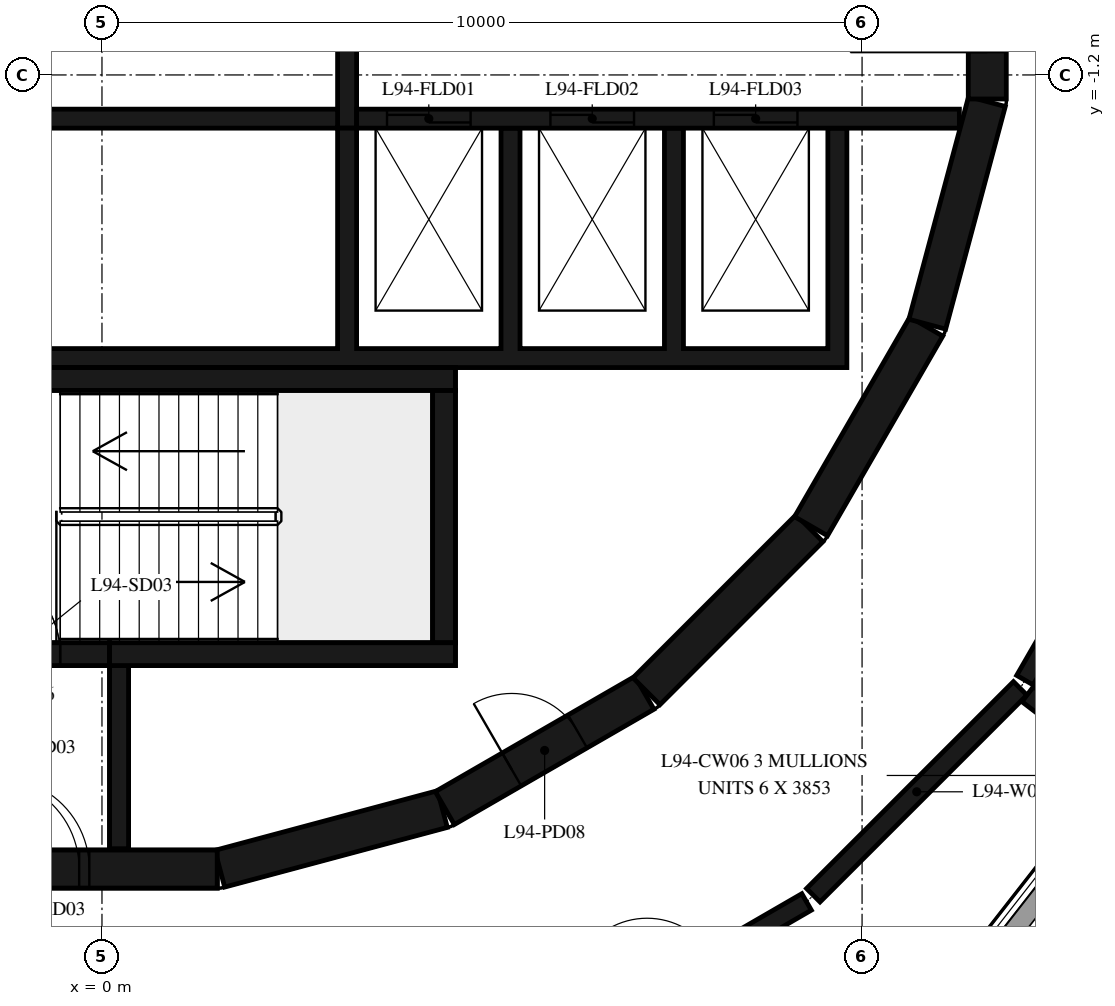
"""IFC4 building model, lengths in metres.
Left out: names, types, materials, properties, quantities, classifications, styles, units other than length and angle.
Written with IfcOpenShell. Run it as: python <this file> out.ifc"""

import sys

from ifc_helpers import new_model, si_unit, direction, frame, frame_2d, origin, place, context, subcontext, project, spatial, polyline, rectangle, outline, extrude, element, fill, save


model = new_model("IFC4")
c1 = context("Model", 3, precision=1e-05, world=origin(), true_north=direction((0.0, 1.0)))
c2 = subcontext(c1, "Body", "Model", "MODEL_VIEW")
j1 = project(units=[si_unit("LENGTHUNIT", "METRE"), si_unit("PLANEANGLEUNIT", "RADIAN")], contexts=[c1])
p1 = place(None, origin())
s1 = spatial("IfcSite", under=j1, at=p1, CompositionType="ELEMENT")
p2 = place(p1, origin())
s2 = spatial("IfcBuilding", under=s1, at=p2, CompositionType="ELEMENT")
p3 = place(p2, frame((0.0, 0.0, 366.2)))
s3 = spatial("IfcBuildingStorey", under=s2, at=p3, CompositionType="ELEMENT", Elevation=366.2)
p4 = place(p3, frame((1.55, -11.643, 0.0), z_axis=(0.0, 0.0, 1.0), x_axis=(0.965948410781, 0.258734743916, 0.0)))
e1 = element("IfcWall", 1, at=p4, inside=s3, PredefinedType="SHEAR", context=c2, shape_type="SweptSolid", body=[
    extrude(rectangle(XDim=3.033, YDim=0.5, at=frame_2d((1.516, 0.0))), origin(), (0.0, 0.0, 1.0), 4.8),
])
p5 = place(p3, frame((4.51, -10.845, 0.0), z_axis=(0.0, 0.0, 1.0), x_axis=(0.865975092491, 0.500087131594, 0.0)))
e2 = element("IfcWall", 2, at=p5, inside=s3, PredefinedType="SHEAR", context=c2, shape_type="SweptSolid", body=[
    extrude(rectangle(XDim=3.033, YDim=0.5, at=frame_2d((1.516, 0.0))), origin(), (0.0, 0.0, 1.0), 4.8),
])
p6 = place(p5, frame((1.016, 0.0, 0.0)))
e3 = element("IfcOpeningElement", 3, at=p6, cuts=e2, PredefinedType="OPENING", context=c2, shape_type="SweptSolid", body=[
    extrude(rectangle(XDim=1.0, YDim=2.4, at=frame_2d((0.5, 1.2))), frame((0.0, 0.26, 0.0), z_axis=(0.0, -1.0, 0.0), x_axis=(1.0, 0.0, 0.0)), (0.0, 0.0, 1.0), 0.52),
])
p7 = place(p3, frame((7.164, -9.308, 0.0), z_axis=(0.0, 0.0, 1.0), x_axis=(0.707106781187, 0.707106781187, 0.0)))
e4 = element("IfcWall", 4, at=p7, inside=s3, PredefinedType="SHEAR", context=c2, shape_type="SweptSolid", body=[
    extrude(rectangle(XDim=3.032, YDim=0.5, at=frame_2d((1.516, 0.0))), origin(), (0.0, 0.0, 1.0), 4.8),
])
for number, where, z_axis, x_axis in (
    (5, (9.329, -7.137, 0.0), (0.0, 0.0, 1.0), (0.5, 0.866, 0.0)),
    (6, (10.858, -4.479, 0.0), (0.0, 0.0, 1.0), (0.259, 0.966, 0.0)),
):
    element("IfcWall", number, at=place(p3, frame(where, z_axis=z_axis, x_axis=x_axis)), inside=s3, PredefinedType="SHEAR", context=c2, shape_type="SweptSolid", body=[
        extrude(rectangle(XDim=3.033, YDim=0.5, at=frame_2d((1.516, 0.0))), origin(), (0.0, 0.0, 1.0), 4.8),
    ])
p8 = place(p3, frame((11.647, -1.516, 0.0), z_axis=(0.0, 0.0, 1.0), x_axis=(0.0, 1.0, 0.0)))
e7 = element("IfcWall", 7, at=p8, inside=s3, PredefinedType="SHEAR", context=c2, shape_type="SweptSolid", body=[
    extrude(rectangle(XDim=3.033, YDim=0.5, at=frame_2d((1.516, 0.0))), origin(), (0.0, 0.0, 1.0), 4.8),
])
p9 = place(p8, frame((0.616, 0.0, 0.0)))
e8 = element("IfcOpeningElement", 8, at=p9, cuts=e7, PredefinedType="OPENING", context=c2, shape_type="SweptSolid", body=[
    extrude(rectangle(XDim=1.8, YDim=2.1, at=frame_2d((0.9, 1.05))), frame((0.0, 0.26, 0.0), z_axis=(0.0, -1.0, 0.0), x_axis=(1.0, 0.0, 0.0)), (0.0, 0.0, 1.0), 0.52),
])
p10 = place(p3, frame((-1.516, -11.647, 0.0), z_axis=(0.0, 0.0, 1.0), x_axis=(1.0, 0.0, 0.0)))
e9 = element("IfcWall", 9, at=p10, inside=s3, PredefinedType="SHEAR", context=c2, shape_type="SweptSolid", body=[
    extrude(rectangle(XDim=3.033, YDim=0.5, at=frame_2d((1.516, 0.0))), origin(), (0.0, 0.0, 1.0), 4.8),
])
p11 = place(p10, frame((0.016, 0.0, 0.0)))
e10 = element("IfcOpeningElement", 10, at=p11, cuts=e9, PredefinedType="OPENING", context=c2, shape_type="SweptSolid", body=[
    extrude(rectangle(XDim=1.2, YDim=2.1, at=frame_2d((0.6, 1.05))), frame((0.0, 0.26, 0.0), z_axis=(0.0, -1.0, 0.0), x_axis=(1.0, 0.0, 0.0)), (0.0, 0.0, 1.0), 0.52),
])
p12 = place(p3, frame((-2.4, -5.2, 0.0), z_axis=(0.0, 0.0, 1.0), x_axis=(1.0, 0.0, 0.0)))
e11 = element("IfcWall", 11, at=p12, inside=s3, PredefinedType="SHEAR", context=c2, shape_type="SweptSolid", body=[
    extrude(rectangle(XDim=7.05, YDim=0.3, at=frame_2d((3.525, 0.0))), origin(), (0.0, 0.0, 1.0), 4.8),
])
p13 = place(p3, frame((4.5, -8.67, 0.0), z_axis=(0.0, 0.0, 1.0), x_axis=(0.0, 1.0, 0.0)))
e12 = element("IfcWall", 12, at=p13, inside=s3, PredefinedType="SHEAR", context=c2, shape_type="SweptSolid", body=[
    extrude(rectangle(XDim=3.32, YDim=0.3, at=frame_2d((1.66, 0.0))), origin(), (0.0, 0.0, 1.0), 4.8),
])
p14 = place(p3, frame((0.1, -8.82, 0.0), z_axis=(0.0, 0.0, 1.0), x_axis=(1.0, 0.0, 0.0)))
e13 = element("IfcWall", 13, at=p14, inside=s3, PredefinedType="SHEAR", context=c2, shape_type="SweptSolid", body=[
    extrude(rectangle(XDim=4.55, YDim=0.3, at=frame_2d((2.275, 0.0))), origin(), (0.0, 0.0, 1.0), 4.8),
])
p15 = place(p3, frame((-2.4, -8.82, 0.0), z_axis=(0.0, 0.0, 1.0), x_axis=(1.0, 0.0, 0.0)))
e14 = element("IfcWall", 14, at=p15, inside=s3, PredefinedType="SHEAR", context=c2, shape_type="SweptSolid", body=[
    extrude(rectangle(XDim=2.5, YDim=0.3, at=frame_2d((1.25, 0.0))), origin(), (0.0, 0.0, 1.0), 4.8),
])
p16 = place(p15, frame((0.65, 0.0, 0.0)))
e15 = element("IfcOpeningElement", 15, at=p16, cuts=e14, PredefinedType="OPENING", context=c2, shape_type="SweptSolid", body=[
    extrude(rectangle(XDim=1.2, YDim=2.1, at=frame_2d((0.6, 1.05))), frame((0.0, 0.16, 0.0), z_axis=(0.0, -1.0, 0.0), x_axis=(1.0, 0.0, 0.0)), (0.0, 0.0, 1.0), 0.32),
])
p17 = place(p3, frame((0.225, -8.97, 0.0), z_axis=(0.0, 0.0, 1.0), x_axis=(0.0, -1.0, 0.0)))
e16 = element("IfcWall", 16, at=p17, inside=s3, PredefinedType="SHEAR", context=c2, shape_type="SweptSolid", body=[
    extrude(rectangle(XDim=2.41, YDim=0.25, at=frame_2d((1.205, 0.0))), origin(), (0.0, 0.0, 1.0), 4.8),
])
p18 = place(p3, origin())
e17 = element("IfcWall", 17, at=p18, inside=s3, PredefinedType="SHEAR", context=c2, shape_type="SweptSolid", body=[
    extrude(outline(polyline([(9.8, -4.8), (9.8, -1.9), (9.55, -1.9), (9.55, -4.8), (7.65, -4.8), (7.65, -1.9), (7.4, -1.9), (7.4, -4.8), (5.5, -4.8), (5.5, -1.9), (5.25, -1.9), (5.25, -4.8), (3.35, -4.8), (3.35, -1.9), (3.1, -1.9), (3.1, -4.8), (-9.55, -4.8), (-9.55, -1.9), (-9.8, -1.9), (-9.8, -4.8), (-9.8, -5.05), (9.8, -5.05), (9.8, -4.8)])), origin(), (0.0, 0.0, 1.0), 4.8),
])
p19 = place(p3, frame((-11.28, -1.775, 0.0), z_axis=(0.0, 0.0, 1.0), x_axis=(1.0, 0.0, 0.0)))
e18 = element("IfcWall", 18, at=p19, inside=s3, PredefinedType="SHEAR", context=c2, shape_type="SweptSolid", body=[
    extrude(rectangle(XDim=14.38, YDim=0.25, at=frame_2d((7.19, 0.0))), origin(), (0.0, 0.0, 1.0), 4.8),
])
p20 = place(p19, frame((7.555, 0.0, 0.0)))
e19 = element("IfcOpeningElement", 19, at=p20, cuts=e18, PredefinedType="OPENING", context=c2, shape_type="SweptSolid", body=[
    extrude(rectangle(XDim=1.0, YDim=2.4, at=frame_2d((0.5, 1.2))), frame((0.0, 0.135, 0.0), z_axis=(0.0, -1.0, 0.0), x_axis=(1.0, 0.0, 0.0)), (0.0, 0.0, 1.0), 0.27),
])
p21 = place(p3, frame((3.35, -1.775, 0.0), z_axis=(0.0, 0.0, 1.0), x_axis=(1.0, 0.0, 0.0)))
e20 = element("IfcWall", 20, at=p21, inside=s3, PredefinedType="SHEAR", context=c2, shape_type="SweptSolid", body=[
    extrude(rectangle(XDim=7.93, YDim=0.25, at=frame_2d((3.965, 0.0))), origin(), (0.0, 0.0, 1.0), 4.8),
])
p22 = place(p21, frame((0.4, 0.0, 0.0)))
e21 = element("IfcOpeningElement", 21, at=p22, cuts=e20, PredefinedType="OPENING", context=c2, shape_type="SweptSolid", body=[
    extrude(rectangle(XDim=1.1, YDim=2.4, at=frame_2d((0.55, 1.2))), frame((0.0, 0.135, 0.0), z_axis=(0.0, -1.0, 0.0), x_axis=(1.0, 0.0, 0.0)), (0.0, 0.0, 1.0), 0.27),
])
p23 = place(p21, frame((2.55, 0.0, 0.0)))
e22 = element("IfcOpeningElement", 22, at=p23, cuts=e20, PredefinedType="OPENING", context=c2, shape_type="SweptSolid", body=[
    extrude(rectangle(XDim=1.1, YDim=2.4, at=frame_2d((0.55, 1.2))), frame((0.0, 0.135, 0.0), z_axis=(0.0, -1.0, 0.0), x_axis=(1.0, 0.0, 0.0)), (0.0, 0.0, 1.0), 0.27),
])
p24 = place(p21, frame((4.7, 0.0, 0.0)))
e23 = element("IfcOpeningElement", 23, at=p24, cuts=e20, PredefinedType="OPENING", context=c2, shape_type="SweptSolid", body=[
    extrude(rectangle(XDim=1.1, YDim=2.4, at=frame_2d((0.55, 1.2))), frame((0.0, 0.135, 0.0), z_axis=(0.0, -1.0, 0.0), x_axis=(1.0, 0.0, 0.0)), (0.0, 0.0, 1.0), 0.27),
])
p25 = place(p3, frame((3.225, -1.9, 0.0), z_axis=(0.0, 0.0, 1.0), x_axis=(0.0, 1.0, 0.0)))
e24 = element("IfcWall", 24, at=p25, inside=s3, PredefinedType="SHEAR", context=c2, shape_type="SweptSolid", body=[
    extrude(rectangle(XDim=3.8, YDim=0.25, at=frame_2d((1.9, 0.0))), origin(), (0.0, 0.0, 1.0), 4.8),
])
p26 = place(p3, frame((-2.4, -5.2, 5.2), z_axis=(0.0, 0.0, 1.0), x_axis=(1.0, 0.0, 0.0)))
e25 = element("IfcWall", 25, at=p26, inside=s3, PredefinedType="SHEAR", context=c2, shape_type="SweptSolid", body=[
    extrude(rectangle(XDim=7.05, YDim=0.3, at=frame_2d((3.525, 0.0))), origin(), (0.0, 0.0, 1.0), 3.4),
])
p27 = place(p3, frame((4.5, -8.67, 5.2), z_axis=(0.0, 0.0, 1.0), x_axis=(0.0, 1.0, 0.0)))
e26 = element("IfcWall", 26, at=p27, inside=s3, PredefinedType="SHEAR", context=c2, shape_type="SweptSolid", body=[
    extrude(rectangle(XDim=3.32, YDim=0.3, at=frame_2d((1.66, 0.0))), origin(), (0.0, 0.0, 1.0), 3.4),
])
p28 = place(p3, frame((0.1, -8.82, 5.2), z_axis=(0.0, 0.0, 1.0), x_axis=(1.0, 0.0, 0.0)))
e27 = element("IfcWall", 27, at=p28, inside=s3, PredefinedType="SHEAR", context=c2, shape_type="SweptSolid", body=[
    extrude(rectangle(XDim=4.55, YDim=0.3, at=frame_2d((2.275, 0.0))), origin(), (0.0, 0.0, 1.0), 3.4),
])
p29 = place(p3, frame((-2.4, -8.82, 5.2), z_axis=(0.0, 0.0, 1.0), x_axis=(1.0, 0.0, 0.0)))
e28 = element("IfcWall", 28, at=p29, inside=s3, PredefinedType="SHEAR", context=c2, shape_type="SweptSolid", body=[
    extrude(rectangle(XDim=2.5, YDim=0.3, at=frame_2d((1.25, 0.0))), origin(), (0.0, 0.0, 1.0), 3.4),
])
p30 = place(p29, frame((0.65, 0.0, 0.0)))
e29 = element("IfcOpeningElement", 29, at=p30, cuts=e28, PredefinedType="OPENING", context=c2, shape_type="SweptSolid", body=[
    extrude(rectangle(XDim=1.2, YDim=2.1, at=frame_2d((0.6, 1.05))), frame((0.0, 0.16, 0.0), z_axis=(0.0, -1.0, 0.0), x_axis=(1.0, 0.0, 0.0)), (0.0, 0.0, 1.0), 0.32),
])
p31 = place(p3, frame((0.225, -8.97, 5.2), z_axis=(0.0, 0.0, 1.0), x_axis=(0.0, -1.0, 0.0)))
e30 = element("IfcWall", 30, at=p31, inside=s3, PredefinedType="SHEAR", context=c2, shape_type="SweptSolid", body=[
    extrude(rectangle(XDim=2.41, YDim=0.25, at=frame_2d((1.205, 0.0))), origin(), (0.0, 0.0, 1.0), 3.4),
])
p32 = place(p3, frame((-1.516, -11.647, 5.2), z_axis=(0.0, 0.0, 1.0), x_axis=(1.0, 0.0, 0.0)))
e31 = element("IfcWall", 31, at=p32, inside=s3, PredefinedType="SHEAR", context=c2, shape_type="SweptSolid", body=[
    extrude(rectangle(XDim=3.033, YDim=0.5, at=frame_2d((1.516, 0.0))), origin(), (0.0, 0.0, 1.0), 3.4),
])
p33 = place(p32, frame((0.15, 0.0, 0.0)))
e32 = element("IfcOpeningElement", 32, at=p33, cuts=e31, PredefinedType="OPENING", context=c2, shape_type="SweptSolid", body=[
    extrude(rectangle(XDim=1.2, YDim=2.1, at=frame_2d((0.6, 1.05))), frame((0.0, 0.26, 0.0), z_axis=(0.0, -1.0, 0.0), x_axis=(1.0, 0.0, 0.0)), (0.0, 0.0, 1.0), 0.52),
])
p34 = place(p3, frame((5.938, -14.007, 0.0), z_axis=(0.0, 0.0, 1.0), x_axis=(0.865615852585, 0.500708693508, 0.0)))
e33 = element("IfcWall", 33, at=p34, inside=s3, PredefinedType="PARTITIONING", context=c2, shape_type="SweptSolid", body=[
    extrude(rectangle(XDim=3.849, YDim=0.25, at=frame_2d((1.925, 0.0))), origin(), (0.0, 0.0, 1.0), 4.8),
])
p35 = place(p34, frame((1.425, 0.0, 0.0)))
e34 = element("IfcOpeningElement", 34, at=p35, cuts=e33, PredefinedType="OPENING", context=c2, shape_type="SweptSolid", body=[
    extrude(rectangle(XDim=1.0, YDim=2.1, at=frame_2d((0.5, 1.05))), frame((0.0, 0.135, 0.0), z_axis=(0.0, -1.0, 0.0), x_axis=(1.0, 0.0, 0.0)), (0.0, 0.0, 1.0), 0.27),
])
p36 = place(p3, frame((9.358, -11.992, 0.0), z_axis=(0.0, 0.0, 1.0), x_axis=(0.707106781187, 0.707106781187, 0.0)))
e35 = element("IfcWall", 35, at=p36, inside=s3, PredefinedType="PARTITIONING", context=c2, shape_type="SweptSolid", body=[
    extrude(rectangle(XDim=3.849, YDim=0.25, at=frame_2d((1.925, 0.0))), origin(), (0.0, 0.0, 1.0), 4.8),
])
p37 = place(p3, frame((12.179, -9.346, 0.0), z_axis=(0.0, 0.0, 1.0), x_axis=(0.794031553294, -0.607876543694, 0.0)))
e36 = element("IfcWall", 36, at=p37, inside=s3, PredefinedType="PARTITIONING", context=c2, shape_type="SweptSolid", body=[
    extrude(rectangle(XDim=1.487, YDim=0.25, at=frame_2d((0.744, 0.0))), origin(), (0.0, 0.0, 1.0), 4.8),
])
p38 = place(p3, frame((12.143, -9.162, 0.0), z_axis=(0.0, 0.0, 1.0), x_axis=(0.500756218026, 0.865588360659, 0.0)))
e37 = element("IfcWall", 37, at=p38, inside=s3, PredefinedType="PARTITIONING", context=c2, shape_type="SweptSolid", body=[
    extrude(rectangle(XDim=3.849, YDim=0.25, at=frame_2d((1.925, 0.0))), origin(), (0.0, 0.0, 1.0), 4.8),
])
p39 = place(p16, origin())
e38 = element("IfcDoor", 38, at=p39, inside=s3, OperationType="SINGLE_SWING_LEFT", PredefinedType="DOOR", context=c2, shape_type="SweptSolid", body=[
    extrude(rectangle(XDim=1.2, YDim=2.1, at=frame_2d((0.6, 1.05))), frame((0.0, 0.025, 0.0), z_axis=(0.0, -1.0, 0.0), x_axis=(1.0, 0.0, 0.0)), (0.0, 0.0, 1.0), 0.05),
])
fill(e15, e38)
p40 = place(p11, origin())
e39 = element("IfcDoor", 39, at=p40, inside=s3, OperationType="SINGLE_SWING_RIGHT", PredefinedType="DOOR", context=c2, shape_type="SweptSolid", body=[
    extrude(rectangle(XDim=1.2, YDim=2.1, at=frame_2d((0.6, 1.05))), frame((0.0, 0.025, 0.0), z_axis=(0.0, -1.0, 0.0), x_axis=(1.0, 0.0, 0.0)), (0.0, 0.0, 1.0), 0.05),
])
fill(e10, e39)
p41 = place(p9, origin())
e40 = element("IfcDoor", 40, at=p41, inside=s3, OperationType="DOUBLE_DOOR_SINGLE_SWING", PredefinedType="DOOR", context=c2, shape_type="SweptSolid", body=[
    extrude(rectangle(XDim=1.8, YDim=2.1, at=frame_2d((0.9, 1.05))), frame((0.0, 0.025, 0.0), z_axis=(0.0, -1.0, 0.0), x_axis=(1.0, 0.0, 0.0)), (0.0, 0.0, 1.0), 0.05),
])
fill(e8, e40)
p42 = place(p22, origin())
e41 = element("IfcDoor", 41, at=p42, inside=s3, OperationType="DOUBLE_DOOR_SLIDING", PredefinedType="DOOR", context=c2, shape_type="SweptSolid", body=[
    extrude(rectangle(XDim=1.1, YDim=2.4, at=frame_2d((0.55, 1.2))), frame((0.0, 0.025, 0.0), z_axis=(0.0, -1.0, 0.0), x_axis=(1.0, 0.0, 0.0)), (0.0, 0.0, 1.0), 0.05),
])
fill(e21, e41)
p43 = place(p23, origin())
e42 = element("IfcDoor", 42, at=p43, inside=s3, OperationType="DOUBLE_DOOR_SLIDING", PredefinedType="DOOR", context=c2, shape_type="SweptSolid", body=[
    extrude(rectangle(XDim=1.1, YDim=2.4, at=frame_2d((0.55, 1.2))), frame((0.0, 0.025, 0.0), z_axis=(0.0, -1.0, 0.0), x_axis=(1.0, 0.0, 0.0)), (0.0, 0.0, 1.0), 0.05),
])
fill(e22, e42)
p44 = place(p24, origin())
e43 = element("IfcDoor", 43, at=p44, inside=s3, OperationType="DOUBLE_DOOR_SLIDING", PredefinedType="DOOR", context=c2, shape_type="SweptSolid", body=[
    extrude(rectangle(XDim=1.1, YDim=2.4, at=frame_2d((0.55, 1.2))), frame((0.0, 0.025, 0.0), z_axis=(0.0, -1.0, 0.0), x_axis=(1.0, 0.0, 0.0)), (0.0, 0.0, 1.0), 0.05),
])
fill(e23, e43)
p45 = place(p6, origin())
e44 = element("IfcDoor", 44, at=p45, inside=s3, OperationType="SINGLE_SWING_LEFT", PredefinedType="DOOR", context=c2, shape_type="SweptSolid", body=[
    extrude(rectangle(XDim=1.0, YDim=2.4, at=frame_2d((0.5, 1.2))), frame((0.0, 0.025, 0.0), z_axis=(0.0, -1.0, 0.0), x_axis=(1.0, 0.0, 0.0)), (0.0, 0.0, 1.0), 0.05),
])
fill(e3, e44)
p46 = place(p30, origin())
e45 = element("IfcDoor", 45, at=p46, inside=s3, OperationType="SINGLE_SWING_RIGHT", PredefinedType="DOOR", context=c2, shape_type="SweptSolid", body=[
    extrude(rectangle(XDim=1.2, YDim=2.1, at=frame_2d((0.6, 1.05))), frame((0.0, 0.025, 0.0), z_axis=(0.0, -1.0, 0.0), x_axis=(1.0, 0.0, 0.0)), (0.0, 0.0, 1.0), 0.05),
])
fill(e29, e45)
p47 = place(p33, origin())
e46 = element("IfcDoor", 46, at=p47, inside=s3, OperationType="SINGLE_SWING_LEFT", PredefinedType="DOOR", context=c2, shape_type="SweptSolid", body=[
    extrude(rectangle(XDim=1.2, YDim=2.1, at=frame_2d((0.6, 1.05))), frame((0.0, 0.025, 0.0), z_axis=(0.0, -1.0, 0.0), x_axis=(1.0, 0.0, 0.0)), (0.0, 0.0, 1.0), 0.05),
])
fill(e32, e46)
save(model, sys.argv[1])
